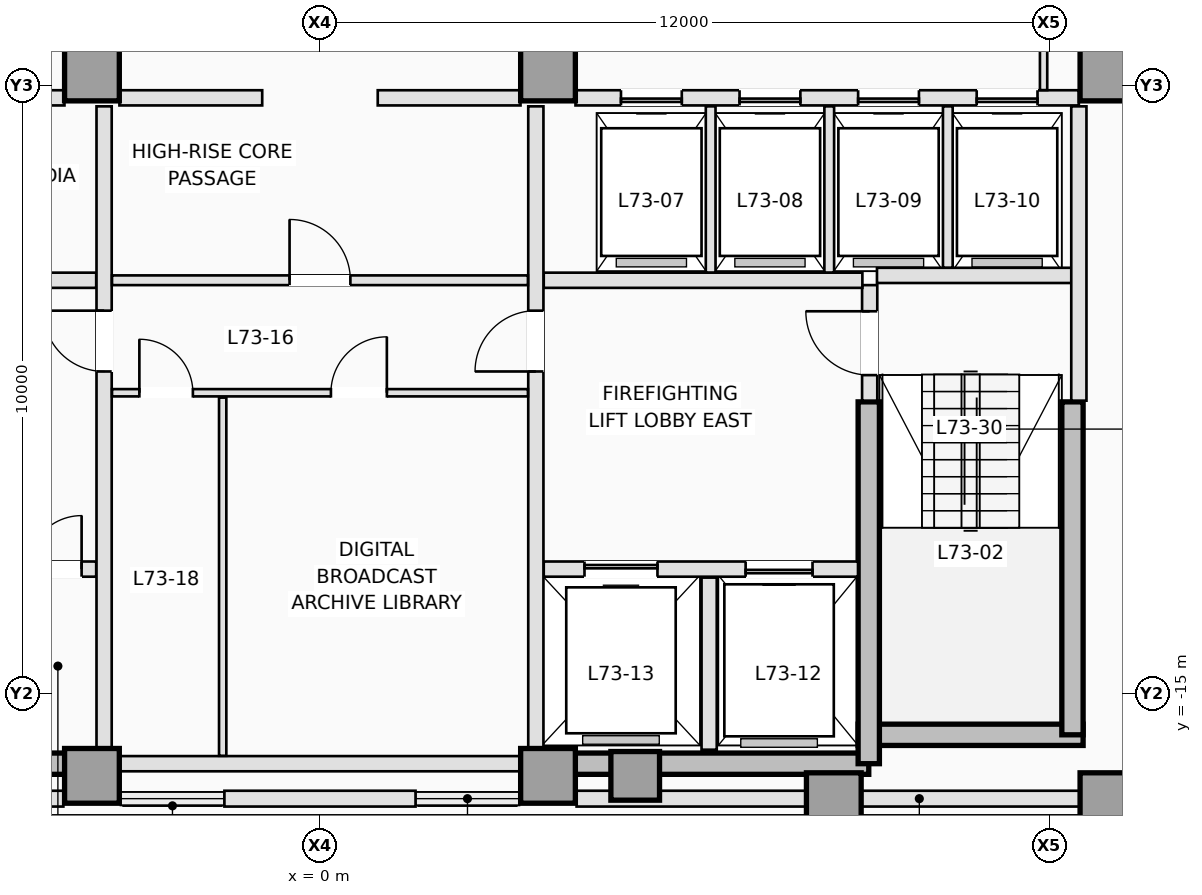
"""IFC4 building model, lengths in metres.
Left out: names, types, materials, properties, quantities, classifications, styles, units other than length and angle.
Written with IfcOpenShell. Run it as: python <this file> out.ifc"""

import sys

from ifc_helpers import new_model, si_unit, direction, frame, frame_2d, origin, origin_2d, place, context, subcontext, project, spatial, rectangle, extrude, element, fill, save


model = new_model("IFC4")
c1 = context("Model", 3, precision=1e-05, world=origin(), true_north=direction((0.0, 1.0)))
c2 = subcontext(c1, "Body", "Model", "MODEL_VIEW")
j1 = project(units=[si_unit("LENGTHUNIT", "METRE"), si_unit("PLANEANGLEUNIT", "RADIAN")], contexts=[c1])
p1 = place(None, origin())
s1 = spatial("IfcSite", under=j1, at=p1, CompositionType="ELEMENT")
p2 = place(p1, origin())
s2 = spatial("IfcBuilding", under=s1, at=p2, CompositionType="ELEMENT")
p3 = place(p2, frame((0.0, 0.0, 263.9)))
s3 = spatial("IfcBuildingStorey", under=s2, at=p3, CompositionType="ELEMENT", Elevation=263.9)
for number, where, z_axis, x_axis in (
    (1, (-9.025, -16.15, 0.0), (0.0, 0.0, 1.0), (1.0, 0.0, 0.0)),
    (2, (3.75, -16.15, 0.0), (0.0, 0.0, 1.0), (1.0, 0.0, 0.0)),
):
    element("IfcWall", number, at=place(p3, frame(where, z_axis=z_axis, x_axis=x_axis)), inside=s3, PredefinedType="SHEAR", context=c2, shape_type="SweptSolid", body=[
        extrude(rectangle(XDim=5.275, YDim=0.35, at=frame_2d((2.637, 0.0))), origin(), (0.0, 0.0, 1.0), 3.5),
    ])
p4 = place(p3, frame((8.85, -15.675, 0.0), z_axis=(0.0, 0.0, 1.0), x_axis=(1.0, 0.0, 0.0)))
e3 = element("IfcWall", 3, at=p4, inside=s3, PredefinedType="SHEAR", context=c2, shape_type="SweptSolid", body=[
    extrude(rectangle(XDim=3.7, YDim=0.35, at=frame_2d((1.85, 0.0))), origin(), (0.0, 0.0, 1.0), 3.5),
])
p5 = place(p3, frame((12.375, -15.675, 0.0), z_axis=(0.0, 0.0, 1.0), x_axis=(0.0, 1.0, 0.0)))
e4 = element("IfcWall", 4, at=p5, inside=s3, PredefinedType="SHEAR", context=c2, shape_type="SweptSolid", body=[
    extrude(rectangle(XDim=5.475, YDim=0.35, at=frame_2d((2.738, 0.0))), origin(), (0.0, 0.0, 1.0), 3.5),
])
p6 = place(p3, frame((9.025, -16.15, 0.0), z_axis=(0.0, 0.0, 1.0), x_axis=(0.0, 1.0, 0.0)))
e5 = element("IfcWall", 5, at=p6, inside=s3, PredefinedType="SHEAR", context=c2, shape_type="SweptSolid", body=[
    extrude(rectangle(XDim=5.95, YDim=0.35, at=frame_2d((2.975, 0.0))), origin(), (0.0, 0.0, 1.0), 3.5),
])
for number, where, z_axis, x_axis in (
    (6, (-3.75, -16.35, 0.0), (0.0, 0.0, 1.0), (1.0, 0.0, 0.0)),
    (7, (3.75, -16.35, 0.0), (0.0, 0.0, 1.0), (1.0, 0.0, 0.0)),
    (8, (8.45, -16.75, 0.0), (0.0, 0.0, 1.0), (1.0, 0.0, 0.0)),
    (9, (12.95, -16.75, 0.0), (0.0, 0.0, 1.0), (1.0, 0.0, 0.0)),
    (10, (-3.75, -4.8, 0.0), (0.0, 0.0, 1.0), (1.0, 0.0, 0.0)),
    (11, (3.75, -4.8, 0.0), (0.0, 0.0, 1.0), (1.0, 0.0, 0.0)),
    (12, (12.95, -4.8, 0.0), (0.0, 0.0, 1.0), (1.0, 0.0, 0.0)),
):
    element("IfcColumn", number, at=place(p3, frame(where, z_axis=z_axis, x_axis=x_axis)), inside=s3, PredefinedType="COLUMN", context=c2, shape_type="SweptSolid", body=[
        extrude(rectangle(XDim=0.9, YDim=0.9, at=origin_2d()), origin(), (0.0, 0.0, 1.0), 3.5),
    ])
p7 = place(p3, frame((5.184, -16.35, 0.0), z_axis=(0.0, 0.0, 1.0), x_axis=(0.0, 1.0, 0.0)))
e13 = element("IfcColumn", 13, at=p7, inside=s3, PredefinedType="COLUMN", context=c2, shape_type="SweptSolid", body=[
    extrude(rectangle(XDim=0.8, YDim=0.8, at=origin_2d()), origin(), (0.0, 0.0, 1.0), 3.5),
])
for number, where, z_axis, x_axis in (
    (14, (15.493, -16.725, 0.0), (0.0, 0.0, 1.0), (-1.0, 0.0, 0.0)),
    (15, (-4.22, -16.725, 0.0), (0.0, 0.0, 1.0), (-1.0, 0.0, 0.0)),
):
    element("IfcWall", number, at=place(p3, frame(where, z_axis=z_axis, x_axis=x_axis)), inside=s3, PredefinedType="STANDARD", context=c2, shape_type="SweptSolid", body=[
        extrude(rectangle(XDim=11.273, YDim=0.26, at=frame_2d((5.636, 0.0))), origin(), (0.0, 0.0, 1.0), 2.79),
    ])
p8 = place(p3, frame((1.572, -16.725, 0.0), z_axis=(0.0, 0.0, 1.0), x_axis=(-1.0, 0.0, 0.0)))
e16 = element("IfcWall", 16, at=p8, inside=s3, PredefinedType="STANDARD", context=c2, shape_type="SweptSolid", body=[
    extrude(rectangle(XDim=3.143, YDim=0.26, at=frame_2d((1.572, 0.0))), origin(), (0.0, 0.0, 1.0), 3.25),
])
p9 = place(p3, frame((9.04, -10.18, 0.0), z_axis=(0.0, 0.0, 1.0), x_axis=(0.0, 1.0, 0.0)))
e17 = element("IfcWall", 17, at=p9, inside=s3, PredefinedType="PARTITIONING", context=c2, shape_type="SweptSolid", body=[
    extrude(rectangle(XDim=1.9, YDim=0.25, at=frame_2d((0.95, 0.0))), origin(), (0.0, 0.0, 1.0), 3.25),
])
p10 = place(p9, frame((0.42, 0.0, 0.0)))
e18 = element("IfcOpeningElement", 18, at=p10, cuts=e17, PredefinedType="OPENING", context=c2, shape_type="SweptSolid", body=[
    extrude(rectangle(XDim=1.05, YDim=2.15, at=frame_2d((0.525, 1.075))), frame((0.0, 0.135, 0.0), z_axis=(0.0, -1.0, 0.0), x_axis=(1.0, 0.0, 0.0)), (0.0, 0.0, 1.0), 0.27),
])
p11 = place(p3, frame((9.16, -8.12, 0.0), z_axis=(0.0, 0.0, 1.0), x_axis=(1.0, 0.0, 0.0)))
e19 = element("IfcWall", 19, at=p11, inside=s3, PredefinedType="PARTITIONING", context=c2, shape_type="SweptSolid", body=[
    extrude(rectangle(XDim=3.22, YDim=0.25, at=frame_2d((1.61, 0.0))), origin(), (0.0, 0.0, 1.0), 3.25),
])
p12 = place(p3, frame((12.48, -10.18, 0.0), z_axis=(0.0, 0.0, 1.0), x_axis=(0.0, 1.0, 0.0)))
e20 = element("IfcWall", 20, at=p12, inside=s3, PredefinedType="PARTITIONING", context=c2, shape_type="SweptSolid", body=[
    extrude(rectangle(XDim=4.84, YDim=0.25, at=frame_2d((2.42, 0.0))), origin(), (0.0, 0.0, 1.0), 3.25),
])
p13 = place(p3, frame((-8.848, -12.95, 0.0), z_axis=(0.0, 0.0, 1.0), x_axis=(1.0, 0.0, 0.0)))
e21 = element("IfcWall", 21, at=p13, inside=s3, PredefinedType="PARTITIONING", context=c2, shape_type="SweptSolid", body=[
    extrude(rectangle(XDim=5.168, YDim=0.25, at=frame_2d((2.584, 0.0))), origin(), (0.0, 0.0, 1.0), 3.25),
])
p14 = place(p13, frame((0.748, 0.0, 0.0)))
e22 = element("IfcOpeningElement", 22, at=p14, cuts=e21, PredefinedType="OPENING", context=c2, shape_type="SweptSolid", body=[
    extrude(rectangle(XDim=1.1, YDim=2.15, at=frame_2d((0.55, 1.075))), frame((0.0, 0.135, 0.0), z_axis=(0.0, -1.0, 0.0), x_axis=(1.0, 0.0, 0.0)), (0.0, 0.0, 1.0), 0.27),
])
p15 = place(p13, frame((2.648, 0.0, 0.0)))
e23 = element("IfcOpeningElement", 23, at=p15, cuts=e21, PredefinedType="OPENING", context=c2, shape_type="SweptSolid", body=[
    extrude(rectangle(XDim=0.88, YDim=2.1, at=frame_2d((0.44, 1.05))), frame((0.0, 0.135, 0.0), z_axis=(0.0, -1.0, 0.0), x_axis=(1.0, 0.0, 0.0)), (0.0, 0.0, 1.0), 0.27),
])
p16 = place(p13, frame((4.048, 0.0, 0.0)))
e24 = element("IfcOpeningElement", 24, at=p16, cuts=e21, PredefinedType="OPENING", context=c2, shape_type="SweptSolid", body=[
    extrude(rectangle(XDim=0.88, YDim=2.1, at=frame_2d((0.44, 1.05))), frame((0.0, 0.135, 0.0), z_axis=(0.0, -1.0, 0.0), x_axis=(1.0, 0.0, 0.0)), (0.0, 0.0, 1.0), 0.27),
])
p17 = place(p3, frame((3.68, -12.95, 0.0), z_axis=(0.0, 0.0, 1.0), x_axis=(1.0, 0.0, 0.0)))
e25 = element("IfcWall", 25, at=p17, inside=s3, PredefinedType="PARTITIONING", context=c2, shape_type="SweptSolid", body=[
    extrude(rectangle(XDim=5.168, YDim=0.25, at=frame_2d((2.584, 0.0))), origin(), (0.0, 0.0, 1.0), 3.25),
])
p18 = place(p17, frame((3.32, 0.0, 0.0)))
e26 = element("IfcOpeningElement", 26, at=p18, cuts=e25, PredefinedType="OPENING", context=c2, shape_type="SweptSolid", body=[
    extrude(rectangle(XDim=1.1, YDim=2.15, at=frame_2d((0.55, 1.075))), frame((0.0, 0.135, 0.0), z_axis=(0.0, -1.0, 0.0), x_axis=(1.0, 0.0, 0.0)), (0.0, 0.0, 1.0), 0.27),
])
p19 = place(p17, frame((0.67, 0.0, 0.0)))
e27 = element("IfcOpeningElement", 27, at=p19, cuts=e25, PredefinedType="OPENING", context=c2, shape_type="SweptSolid", body=[
    extrude(rectangle(XDim=1.2, YDim=2.15, at=frame_2d((0.6, 1.075))), frame((0.0, 0.135, 0.0), z_axis=(0.0, -1.0, 0.0), x_axis=(1.0, 0.0, 0.0)), (0.0, 0.0, 1.0), 0.27),
])
p20 = place(p3, frame((6.4, -15.92, 0.0), z_axis=(0.0, 0.0, 1.0), x_axis=(0.0, 1.0, 0.0)))
e28 = element("IfcWall", 28, at=p20, inside=s3, PredefinedType="PARTITIONING", context=c2, shape_type="SweptSolid", body=[
    extrude(rectangle(XDim=2.83, YDim=0.25, at=frame_2d((1.415, 0.0))), origin(), (0.0, 0.0, 1.0), 3.25),
])
for number, where, z_axis, x_axis in (
    (29, (-8.92, -8.2, 0.0), (0.0, 0.0, 1.0), (1.0, 0.0, 0.0)),
    (30, (3.68, -8.2, 0.0), (0.0, 0.0, 1.0), (1.0, 0.0, 0.0)),
):
    element("IfcWall", number, at=place(p3, frame(where, z_axis=z_axis, x_axis=x_axis)), inside=s3, PredefinedType="PARTITIONING", context=c2, shape_type="SweptSolid", body=[
        extrude(rectangle(XDim=5.24, YDim=0.25, at=frame_2d((2.62, 0.0))), origin(), (0.0, 0.0, 1.0), 3.25),
    ])
p21 = place(p3, frame((-3.55, -15.898, 0.0), z_axis=(0.0, 0.0, 1.0), x_axis=(0.0, 1.0, 0.0)))
e31 = element("IfcWall", 31, at=p21, inside=s3, PredefinedType="PARTITIONING", context=c2, shape_type="SweptSolid", body=[
    extrude(rectangle(XDim=10.558, YDim=0.25, at=frame_2d((5.279, 0.0))), origin(), (0.0, 0.0, 1.0), 3.25),
])
p22 = place(p21, frame((6.198, 0.0, 0.0)))
e32 = element("IfcOpeningElement", 32, at=p22, cuts=e31, PredefinedType="OPENING", context=c2, shape_type="SweptSolid", body=[
    extrude(rectangle(XDim=1.0, YDim=2.15, at=frame_2d((0.5, 1.075))), frame((0.0, 0.135, 0.0), z_axis=(0.0, -1.0, 0.0), x_axis=(1.0, 0.0, 0.0)), (0.0, 0.0, 1.0), 0.27),
])
p23 = place(p3, frame((3.55, -15.898, 0.0), z_axis=(0.0, 0.0, 1.0), x_axis=(0.0, 1.0, 0.0)))
e33 = element("IfcWall", 33, at=p23, inside=s3, PredefinedType="PARTITIONING", context=c2, shape_type="SweptSolid", body=[
    extrude(rectangle(XDim=10.558, YDim=0.25, at=frame_2d((5.279, 0.0))), origin(), (0.0, 0.0, 1.0), 3.25),
])
p24 = place(p23, frame((6.198, 0.0, 0.0)))
e34 = element("IfcOpeningElement", 34, at=p24, cuts=e33, PredefinedType="OPENING", context=c2, shape_type="SweptSolid", body=[
    extrude(rectangle(XDim=1.0, YDim=2.15, at=frame_2d((0.5, 1.075))), frame((0.0, 0.135, 0.0), z_axis=(0.0, -1.0, 0.0), x_axis=(1.0, 0.0, 0.0)), (0.0, 0.0, 1.0), 0.27),
])
p25 = place(p3, frame((-12.48, -5.2, 0.0), z_axis=(0.0, 0.0, 1.0), x_axis=(1.0, 0.0, 0.0)))
e35 = element("IfcWall", 35, at=p25, inside=s3, PredefinedType="PARTITIONING", context=c2, shape_type="SweptSolid", body=[
    extrude(rectangle(XDim=8.278, YDim=0.25, at=frame_2d((4.139, 0.0))), origin(), (0.0, 0.0, 1.0), 3.25),
])
p26 = place(p25, frame((3.05, 0.0, 0.0)))
e36 = element("IfcOpeningElement", 36, at=p26, cuts=e35, PredefinedType="OPENING", context=c2, shape_type="SweptSolid", body=[
    extrude(rectangle(XDim=0.92, YDim=2.12, at=frame_2d((0.46, 1.06))), frame((0.0, 0.135, 0.0), z_axis=(0.0, -1.0, 0.0), x_axis=(1.0, 0.0, 0.0)), (0.0, 0.0, 1.0), 0.27),
])
p27 = place(p25, frame((6.15, 0.0, 0.0)))
e37 = element("IfcOpeningElement", 37, at=p27, cuts=e35, PredefinedType="OPENING", context=c2, shape_type="SweptSolid", body=[
    extrude(rectangle(XDim=0.92, YDim=2.12, at=frame_2d((0.46, 1.06))), frame((0.0, 0.135, 0.0), z_axis=(0.0, -1.0, 0.0), x_axis=(1.0, 0.0, 0.0)), (0.0, 0.0, 1.0), 0.27),
])
p28 = place(p3, frame((4.202, -5.2, 0.0), z_axis=(0.0, 0.0, 1.0), x_axis=(1.0, 0.0, 0.0)))
e38 = element("IfcWall", 38, at=p28, inside=s3, PredefinedType="PARTITIONING", context=c2, shape_type="SweptSolid", body=[
    extrude(rectangle(XDim=8.278, YDim=0.25, at=frame_2d((4.139, 0.0))), origin(), (0.0, 0.0, 1.0), 3.25),
])
p29 = place(p28, frame((0.748, 0.0, 0.0)))
e39 = element("IfcOpeningElement", 39, at=p29, cuts=e38, PredefinedType="OPENING", context=c2, shape_type="SweptSolid", body=[
    extrude(rectangle(XDim=1.0, YDim=2.15, at=frame_2d((0.5, 1.075))), frame((0.0, 0.135, 0.0), z_axis=(0.0, -1.0, 0.0), x_axis=(1.0, 0.0, 0.0)), (0.0, 0.0, 1.0), 0.27),
])
p30 = place(p28, frame((2.698, 0.0, 0.0)))
e40 = element("IfcOpeningElement", 40, at=p30, cuts=e38, PredefinedType="OPENING", context=c2, shape_type="SweptSolid", body=[
    extrude(rectangle(XDim=1.0, YDim=2.15, at=frame_2d((0.5, 1.075))), frame((0.0, 0.135, 0.0), z_axis=(0.0, -1.0, 0.0), x_axis=(1.0, 0.0, 0.0)), (0.0, 0.0, 1.0), 0.27),
])
p31 = place(p28, frame((4.648, 0.0, 0.0)))
e41 = element("IfcOpeningElement", 41, at=p31, cuts=e38, PredefinedType="OPENING", context=c2, shape_type="SweptSolid", body=[
    extrude(rectangle(XDim=1.0, YDim=2.15, at=frame_2d((0.5, 1.075))), frame((0.0, 0.135, 0.0), z_axis=(0.0, -1.0, 0.0), x_axis=(1.0, 0.0, 0.0)), (0.0, 0.0, 1.0), 0.27),
])
p32 = place(p28, frame((6.598, 0.0, 0.0)))
e42 = element("IfcOpeningElement", 42, at=p32, cuts=e38, PredefinedType="OPENING", context=c2, shape_type="SweptSolid", body=[
    extrude(rectangle(XDim=1.0, YDim=2.15, at=frame_2d((0.5, 1.075))), frame((0.0, 0.135, 0.0), z_axis=(0.0, -1.0, 0.0), x_axis=(1.0, 0.0, 0.0)), (0.0, 0.0, 1.0), 0.27),
])
for number, where, z_axis, x_axis in (
    (43, (-3.298, -5.2, 0.0), (0.0, 0.0, 1.0), (1.0, 0.0, 0.0)),
    (44, (0.95, -5.2, 0.0), (0.0, 0.0, 1.0), (1.0, 0.0, 0.0)),
):
    element("IfcWall", number, at=place(p3, frame(where, z_axis=z_axis, x_axis=x_axis)), inside=s3, PredefinedType="PARTITIONING", context=c2, shape_type="SweptSolid", body=[
        extrude(rectangle(XDim=2.348, YDim=0.25, at=frame_2d((1.174, 0.0))), origin(), (0.0, 0.0, 1.0), 3.25),
    ])
for number, where, z_axis, x_axis in (
    (45, (6.425, -8.073, 0.0), (0.0, 0.0, 1.0), (0.0, 1.0, 0.0)),
    (46, (8.375, -8.073, 0.0), (0.0, 0.0, 1.0), (0.0, 1.0, 0.0)),
):
    element("IfcWall", number, at=place(p3, frame(where, z_axis=z_axis, x_axis=x_axis)), inside=s3, PredefinedType="PARTITIONING", context=c2, shape_type="SweptSolid", body=[
        extrude(rectangle(XDim=2.733, YDim=0.16, at=frame_2d((1.366, 0.0))), origin(), (0.0, 0.0, 1.0), 3.25),
    ])
p33 = place(p3, frame((10.325, -7.993, 0.0), z_axis=(0.0, 0.0, 1.0), x_axis=(0.0, 1.0, 0.0)))
e47 = element("IfcWall", 47, at=p33, inside=s3, PredefinedType="PARTITIONING", context=c2, shape_type="SweptSolid", body=[
    extrude(rectangle(XDim=2.653, YDim=0.16, at=frame_2d((1.326, 0.0))), origin(), (0.0, 0.0, 1.0), 3.25),
])
p34 = place(p3, frame((-3.298, -16.15, 0.0), z_axis=(0.0, 0.0, 1.0), x_axis=(1.0, 0.0, 0.0)))
e48 = element("IfcWall", 48, at=p34, inside=s3, PredefinedType="PARTITIONING", context=c2, shape_type="SweptSolid", body=[
    extrude(rectangle(XDim=6.596, YDim=0.25, at=frame_2d((3.298, 0.0))), origin(), (0.0, 0.0, 1.0), 2.844),
])
p35 = place(p3, frame((-3.42, -8.2, 0.0), z_axis=(0.0, 0.0, 1.0), x_axis=(1.0, 0.0, 0.0)))
e49 = element("IfcWall", 49, at=p35, inside=s3, PredefinedType="PARTITIONING", context=c2, shape_type="SweptSolid", body=[
    extrude(rectangle(XDim=6.84, YDim=0.16, at=frame_2d((3.42, 0.0))), origin(), (0.0, 0.0, 1.0), 3.25),
])
p36 = place(p35, frame((2.92, 0.0, 0.0)))
e50 = element("IfcOpeningElement", 50, at=p36, cuts=e49, PredefinedType="OPENING", context=c2, shape_type="SweptSolid", body=[
    extrude(rectangle(XDim=1.0, YDim=2.15, at=frame_2d((0.5, 1.075))), frame((0.0, 0.09, 0.0), z_axis=(0.0, -1.0, 0.0), x_axis=(1.0, 0.0, 0.0)), (0.0, 0.0, 1.0), 0.18),
])
p37 = place(p3, frame((-3.42, -10.05, 0.0), z_axis=(0.0, 0.0, 1.0), x_axis=(1.0, 0.0, 0.0)))
e51 = element("IfcWall", 51, at=p37, inside=s3, PredefinedType="PARTITIONING", context=c2, shape_type="SweptSolid", body=[
    extrude(rectangle(XDim=6.84, YDim=0.12, at=frame_2d((3.42, 0.0))), origin(), (0.0, 0.0, 1.0), 3.25),
])
p38 = place(p37, frame((0.45, 0.0, 0.0)))
e52 = element("IfcOpeningElement", 52, at=p38, cuts=e51, PredefinedType="OPENING", context=c2, shape_type="SweptSolid", body=[
    extrude(rectangle(XDim=0.88, YDim=2.12, at=frame_2d((0.44, 1.06))), frame((0.0, 0.07, 0.0), z_axis=(0.0, -1.0, 0.0), x_axis=(1.0, 0.0, 0.0)), (0.0, 0.0, 1.0), 0.14),
])
p39 = place(p37, frame((3.6, 0.0, 0.0)))
e53 = element("IfcOpeningElement", 53, at=p39, cuts=e51, PredefinedType="OPENING", context=c2, shape_type="SweptSolid", body=[
    extrude(rectangle(XDim=0.92, YDim=2.12, at=frame_2d((0.46, 1.06))), frame((0.0, 0.07, 0.0), z_axis=(0.0, -1.0, 0.0), x_axis=(1.0, 0.0, 0.0)), (0.0, 0.0, 1.0), 0.14),
])
p40 = place(p3, frame((-1.6, -16.02, 0.0), z_axis=(0.0, 0.0, 1.0), x_axis=(0.0, 1.0, 0.0)))
e54 = element("IfcWall", 54, at=p40, inside=s3, PredefinedType="PARTITIONING", context=c2, shape_type="SweptSolid", body=[
    extrude(rectangle(XDim=5.89, YDim=0.12, at=frame_2d((2.945, 0.0))), origin(), (0.0, 0.0, 1.0), 3.25),
])
p41 = place(p3, frame((11.9, -2.792, 0.0), z_axis=(0.0, 0.0, 1.0), x_axis=(0.0, -1.0, 0.0)))
e55 = element("IfcWall", 55, at=p41, inside=s3, PredefinedType="PARTITIONING", context=c2, shape_type="SweptSolid", body=[
    extrude(rectangle(XDim=2.281, YDim=0.12, at=frame_2d((1.141, 0.0))), origin(), (0.0, 0.0, 1.0), 3.25),
])
p42 = place(p41, frame((0.578, 0.0, 0.0)))
e56 = element("IfcOpeningElement", 56, at=p42, cuts=e55, PredefinedType="OPENING", context=c2, shape_type="SweptSolid", body=[
    extrude(rectangle(XDim=0.92, YDim=2.12, at=frame_2d((0.46, 1.06))), frame((0.0, 0.07, 0.0), z_axis=(0.0, -1.0, 0.0), x_axis=(1.0, 0.0, 0.0)), (0.0, 0.0, 1.0), 0.14),
])
p43 = place(p29, origin())
e57 = element("IfcDoor", 57, at=p43, inside=s3, OperationType="SLIDING_TO_RIGHT", PredefinedType="DOOR", context=c2, shape_type="SweptSolid", body=[
    extrude(rectangle(XDim=1.0, YDim=2.15, at=frame_2d((0.5, 1.075))), frame((0.0, 0.025, 0.0), z_axis=(0.0, -1.0, 0.0), x_axis=(1.0, 0.0, 0.0)), (0.0, 0.0, 1.0), 0.05),
])
fill(e39, e57)
p44 = place(p30, origin())
e58 = element("IfcDoor", 58, at=p44, inside=s3, OperationType="SLIDING_TO_RIGHT", PredefinedType="DOOR", context=c2, shape_type="SweptSolid", body=[
    extrude(rectangle(XDim=1.0, YDim=2.15, at=frame_2d((0.5, 1.075))), frame((0.0, 0.025, 0.0), z_axis=(0.0, -1.0, 0.0), x_axis=(1.0, 0.0, 0.0)), (0.0, 0.0, 1.0), 0.05),
])
fill(e40, e58)
p45 = place(p31, origin())
e59 = element("IfcDoor", 59, at=p45, inside=s3, OperationType="SLIDING_TO_RIGHT", PredefinedType="DOOR", context=c2, shape_type="SweptSolid", body=[
    extrude(rectangle(XDim=1.0, YDim=2.15, at=frame_2d((0.5, 1.075))), frame((0.0, 0.025, 0.0), z_axis=(0.0, -1.0, 0.0), x_axis=(1.0, 0.0, 0.0)), (0.0, 0.0, 1.0), 0.05),
])
fill(e41, e59)
p46 = place(p32, origin())
e60 = element("IfcDoor", 60, at=p46, inside=s3, OperationType="SLIDING_TO_RIGHT", PredefinedType="DOOR", context=c2, shape_type="SweptSolid", body=[
    extrude(rectangle(XDim=1.0, YDim=2.15, at=frame_2d((0.5, 1.075))), frame((0.0, 0.025, 0.0), z_axis=(0.0, -1.0, 0.0), x_axis=(1.0, 0.0, 0.0)), (0.0, 0.0, 1.0), 0.05),
])
fill(e42, e60)
p47 = place(p18, origin())
e61 = element("IfcDoor", 61, at=p47, inside=s3, OperationType="SLIDING_TO_RIGHT", PredefinedType="DOOR", context=c2, shape_type="SweptSolid", body=[
    extrude(rectangle(XDim=1.1, YDim=2.15, at=frame_2d((0.55, 1.075))), frame((0.0, 0.025, 0.0), z_axis=(0.0, -1.0, 0.0), x_axis=(1.0, 0.0, 0.0)), (0.0, 0.0, 1.0), 0.05),
])
fill(e26, e61)
p48 = place(p19, origin())
e62 = element("IfcDoor", 62, at=p48, inside=s3, OperationType="SLIDING_TO_LEFT", PredefinedType="DOOR", context=c2, shape_type="SweptSolid", body=[
    extrude(rectangle(XDim=1.2, YDim=2.15, at=frame_2d((0.6, 1.075))), frame((0.0, 0.025, 0.0), z_axis=(0.0, -1.0, 0.0), x_axis=(1.0, 0.0, 0.0)), (0.0, 0.0, 1.0), 0.05),
])
fill(e27, e62)
p49 = place(p10, origin())
e63 = element("IfcDoor", 63, at=p49, inside=s3, OperationType="SINGLE_SWING_RIGHT", PredefinedType="DOOR", context=c2, shape_type="SweptSolid", body=[
    extrude(rectangle(XDim=1.05, YDim=2.15, at=frame_2d((0.525, 1.075))), frame((0.0, 0.025, 0.0), z_axis=(0.0, -1.0, 0.0), x_axis=(1.0, 0.0, 0.0)), (0.0, 0.0, 1.0), 0.05),
])
fill(e18, e63)
p50 = place(p16, origin())
e64 = element("IfcDoor", 64, at=p50, inside=s3, OperationType="SINGLE_SWING_RIGHT", PredefinedType="TRAPDOOR", context=c2, shape_type="SweptSolid", body=[
    extrude(rectangle(XDim=0.88, YDim=2.1, at=frame_2d((0.44, 1.05))), frame((0.0, 0.025, 0.0), z_axis=(0.0, -1.0, 0.0), x_axis=(1.0, 0.0, 0.0)), (0.0, 0.0, 1.0), 0.05),
])
fill(e24, e64)
p51 = place(p22, origin())
e65 = element("IfcDoor", 65, at=p51, inside=s3, OperationType="SINGLE_SWING_RIGHT", PredefinedType="DOOR", context=c2, shape_type="SweptSolid", body=[
    extrude(rectangle(XDim=1.0, YDim=2.15, at=frame_2d((0.5, 1.075))), frame((0.0, 0.025, 0.0), z_axis=(0.0, -1.0, 0.0), x_axis=(1.0, 0.0, 0.0)), (0.0, 0.0, 1.0), 0.05),
])
fill(e32, e65)
p52 = place(p24, origin())
e66 = element("IfcDoor", 66, at=p52, inside=s3, OperationType="SINGLE_SWING_LEFT", PredefinedType="DOOR", context=c2, shape_type="SweptSolid", body=[
    extrude(rectangle(XDim=1.0, YDim=2.15, at=frame_2d((0.5, 1.075))), frame((0.0, 0.025, 0.0), z_axis=(0.0, -1.0, 0.0), x_axis=(1.0, 0.0, 0.0)), (0.0, 0.0, 1.0), 0.05),
])
fill(e34, e66)
p53 = place(p36, origin())
e67 = element("IfcDoor", 67, at=p53, inside=s3, OperationType="SINGLE_SWING_LEFT", PredefinedType="DOOR", context=c2, shape_type="SweptSolid", body=[
    extrude(rectangle(XDim=1.0, YDim=2.15, at=frame_2d((0.5, 1.075))), frame((0.0, 0.025, 0.0), z_axis=(0.0, -1.0, 0.0), x_axis=(1.0, 0.0, 0.0)), (0.0, 0.0, 1.0), 0.05),
])
fill(e50, e67)
p54 = place(p38, origin())
e68 = element("IfcDoor", 68, at=p54, inside=s3, OperationType="SINGLE_SWING_LEFT", PredefinedType="DOOR", context=c2, shape_type="SweptSolid", body=[
    extrude(rectangle(XDim=0.88, YDim=2.12, at=frame_2d((0.44, 1.06))), frame((0.0, 0.025, 0.0), z_axis=(0.0, -1.0, 0.0), x_axis=(1.0, 0.0, 0.0)), (0.0, 0.0, 1.0), 0.05),
])
fill(e52, e68)
p55 = place(p39, origin())
e69 = element("IfcDoor", 69, at=p55, inside=s3, OperationType="SINGLE_SWING_RIGHT", PredefinedType="DOOR", context=c2, shape_type="SweptSolid", body=[
    extrude(rectangle(XDim=0.92, YDim=2.12, at=frame_2d((0.46, 1.06))), frame((0.0, 0.025, 0.0), z_axis=(0.0, -1.0, 0.0), x_axis=(1.0, 0.0, 0.0)), (0.0, 0.0, 1.0), 0.05),
])
fill(e53, e69)
save(model, sys.argv[1])
